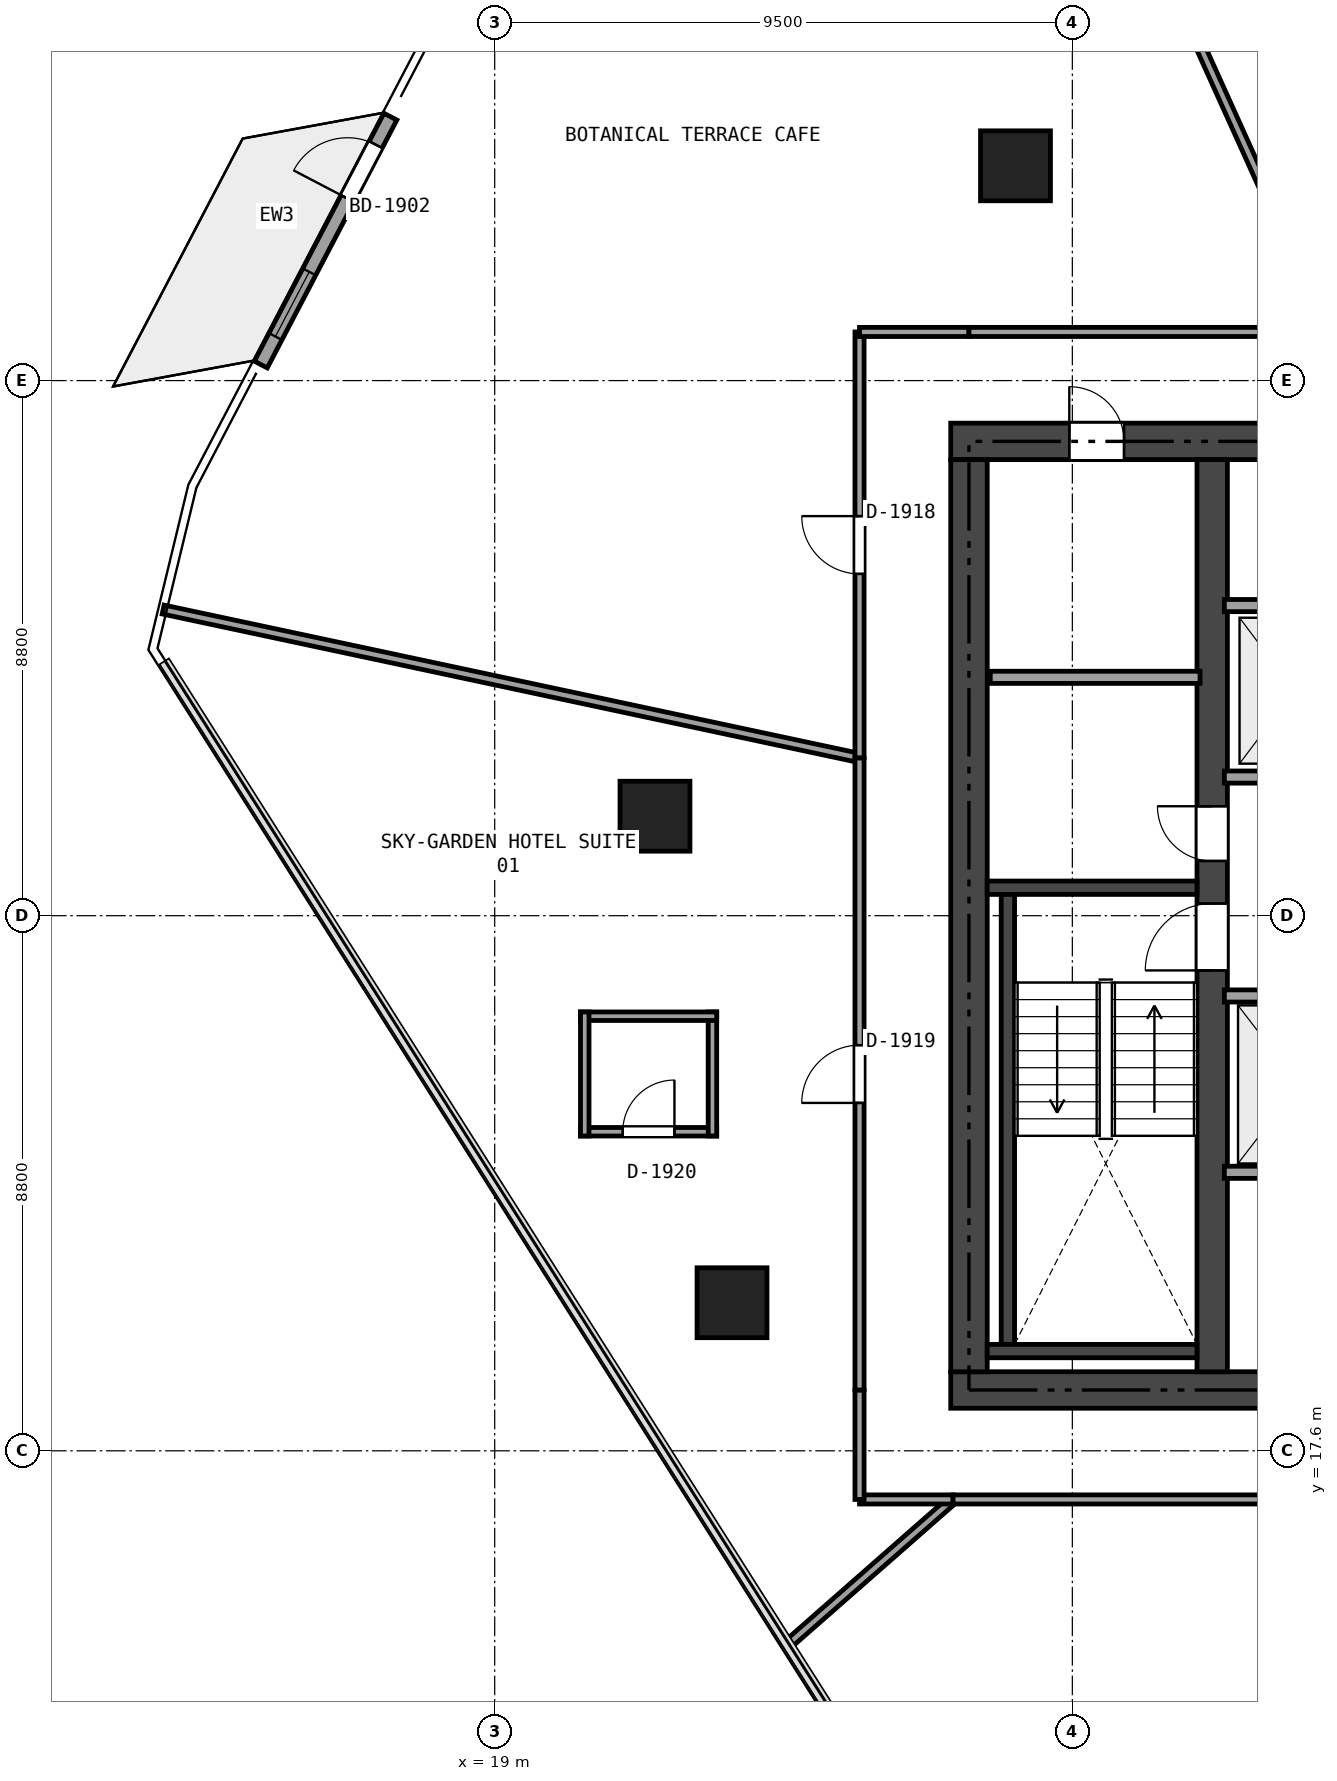
"""IFC4 building model, lengths in metres.
Left out: names, types, materials, properties, quantities, classifications, styles, units other than length and angle.
Written with IfcOpenShell. Run it as: python <this file> out.ifc"""

import sys

from ifc_helpers import new_model, si_unit, direction, frame, frame_2d, origin, origin_2d, place, context, subcontext, project, spatial, rectangle, extrude, element, fill, save


model = new_model("IFC4")
c1 = context("Model", 3, precision=1e-05, world=origin(), true_north=direction((0.0, 1.0)))
c2 = subcontext(c1, "Body", "Model", "MODEL_VIEW")
j1 = project(units=[si_unit("LENGTHUNIT", "METRE"), si_unit("PLANEANGLEUNIT", "RADIAN")], contexts=[c1])
p1 = place(None, origin())
s1 = spatial("IfcSite", under=j1, at=p1, CompositionType="ELEMENT")
p2 = place(p1, origin())
s2 = spatial("IfcBuilding", under=s1, at=p2, CompositionType="ELEMENT")
p3 = place(p2, frame((0.0, 0.0, 76.35)))
s3 = spatial("IfcBuildingStorey", under=s2, at=p3, CompositionType="ELEMENT", Elevation=76.35)
p4 = place(p3, frame((26.5, 18.6, 0.0), z_axis=(0.0, 0.0, 1.0), x_axis=(1.0, 0.0, 0.0)))
e1 = element("IfcWall", 1, at=p4, inside=s3, PredefinedType="SHEAR", context=c2, shape_type="SweptSolid", body=[
    extrude(rectangle(XDim=21.4, YDim=0.6, at=frame_2d((10.7, 0.0))), origin(), (0.0, 0.0, 1.0), 3.17),
])
p5 = place(p4, frame((12.425, 0.0, 0.0)))
e2 = element("IfcOpeningElement", 2, at=p5, cuts=e1, PredefinedType="OPENING", context=c2, shape_type="SweptSolid", body=[
    extrude(rectangle(XDim=1.15, YDim=2.15, at=frame_2d((0.575, 1.075))), frame((0.0, 0.31, 0.0), z_axis=(0.0, -1.0, 0.0), x_axis=(1.0, 0.0, 0.0)), (0.0, 0.0, 1.0), 0.62),
])
p6 = place(p4, frame((5.25, 0.0, 0.0)))
e3 = element("IfcOpeningElement", 3, at=p6, cuts=e1, PredefinedType="OPENING", context=c2, shape_type="SweptSolid", body=[
    extrude(rectangle(XDim=0.9, YDim=2.1, at=frame_2d((0.45, 1.05))), frame((0.0, 0.31, 0.0), z_axis=(0.0, -1.0, 0.0), x_axis=(1.0, 0.0, 0.0)), (0.0, 0.0, 1.0), 0.62),
])
p7 = place(p3, frame((26.5, 34.2, 0.0), z_axis=(0.0, 0.0, 1.0), x_axis=(1.0, 0.0, 0.0)))
e4 = element("IfcWall", 4, at=p7, inside=s3, PredefinedType="SHEAR", context=c2, shape_type="SweptSolid", body=[
    extrude(rectangle(XDim=21.4, YDim=0.6, at=frame_2d((10.7, 0.0))), origin(), (0.0, 0.0, 1.0), 3.17),
])
p8 = place(p7, frame((9.7, 0.0, 0.0)))
e5 = element("IfcOpeningElement", 5, at=p8, cuts=e4, PredefinedType="OPENING", context=c2, shape_type="SweptSolid", body=[
    extrude(rectangle(XDim=1.1, YDim=2.15, at=frame_2d((0.55, 1.075))), frame((0.0, 0.31, 0.0), z_axis=(0.0, -1.0, 0.0), x_axis=(1.0, 0.0, 0.0)), (0.0, 0.0, 1.0), 0.62),
])
p9 = place(p7, frame((1.95, 0.0, 0.0)))
e6 = element("IfcOpeningElement", 6, at=p9, cuts=e4, PredefinedType="OPENING", context=c2, shape_type="SweptSolid", body=[
    extrude(rectangle(XDim=0.9, YDim=2.1, at=frame_2d((0.45, 1.05))), frame((0.0, 0.31, 0.0), z_axis=(0.0, -1.0, 0.0), x_axis=(1.0, 0.0, 0.0)), (0.0, 0.0, 1.0), 0.62),
])
p10 = place(p7, frame((6.25, 0.0, 0.0)))
e7 = element("IfcOpeningElement", 7, at=p10, cuts=e4, PredefinedType="OPENING", context=c2, shape_type="SweptSolid", body=[
    extrude(rectangle(XDim=0.9, YDim=2.1, at=frame_2d((0.45, 1.05))), frame((0.0, 0.31, 0.0), z_axis=(0.0, -1.0, 0.0), x_axis=(1.0, 0.0, 0.0)), (0.0, 0.0, 1.0), 0.62),
])
p11 = place(p3, frame((26.8, 18.9, 0.0), z_axis=(0.0, 0.0, 1.0), x_axis=(0.0, 1.0, 0.0)))
e8 = element("IfcWall", 8, at=p11, inside=s3, PredefinedType="SHEAR", context=c2, shape_type="SweptSolid", body=[
    extrude(rectangle(XDim=15.0, YDim=0.6, at=frame_2d((7.5, 0.0))), origin(), (0.0, 0.0, 1.0), 3.17),
])
p12 = place(p3, frame((30.8, 18.9, 0.0), z_axis=(0.0, 0.0, 1.0), x_axis=(0.0, 1.0, 0.0)))
e9 = element("IfcWall", 9, at=p12, inside=s3, PredefinedType="SHEAR", context=c2, shape_type="SweptSolid", body=[
    extrude(rectangle(XDim=15.0, YDim=0.5, at=frame_2d((7.5, 0.0))), origin(), (0.0, 0.0, 1.0), 3.17),
])
p13 = place(p12, frame((6.6, 0.0, 0.0)))
e10 = element("IfcOpeningElement", 10, at=p13, cuts=e9, PredefinedType="OPENING", context=c2, shape_type="SweptSolid", body=[
    extrude(rectangle(XDim=1.1, YDim=2.15, at=frame_2d((0.55, 1.075))), frame((0.0, 0.26, 0.0), z_axis=(0.0, -1.0, 0.0), x_axis=(1.0, 0.0, 0.0)), (0.0, 0.0, 1.0), 0.52),
])
p14 = place(p12, frame((8.4, 0.0, 0.0)))
e11 = element("IfcOpeningElement", 11, at=p14, cuts=e9, PredefinedType="OPENING", context=c2, shape_type="SweptSolid", body=[
    extrude(rectangle(XDim=0.9, YDim=2.1, at=frame_2d((0.45, 1.05))), frame((0.0, 0.26, 0.0), z_axis=(0.0, -1.0, 0.0), x_axis=(1.0, 0.0, 0.0)), (0.0, 0.0, 1.0), 0.52),
])
p15 = place(p3, frame((27.1, 26.86, 0.0), z_axis=(0.0, 0.0, 1.0), x_axis=(1.0, 0.0, 0.0)))
e12 = element("IfcWall", 12, at=p15, inside=s3, PredefinedType="SHEAR", context=c2, shape_type="SweptSolid", body=[
    extrude(rectangle(XDim=3.45, YDim=0.22, at=frame_2d((1.725, 0.0))), origin(), (0.0, 0.0, 1.0), 3.17),
])
p16 = place(p3, frame((27.44, 19.35, 0.0), z_axis=(0.0, 0.0, 1.0), x_axis=(0.0, 1.0, 0.0)))
e13 = element("IfcWall", 13, at=p16, inside=s3, PredefinedType="SHEAR", context=c2, shape_type="SweptSolid", body=[
    extrude(rectangle(XDim=7.4, YDim=0.22, at=frame_2d((3.7, 0.0))), origin(), (0.0, 0.0, 1.0), 3.17),
])
p17 = place(p3, frame((27.1, 19.24, 0.0), z_axis=(0.0, 0.0, 1.0), x_axis=(1.0, 0.0, 0.0)))
e14 = element("IfcWall", 14, at=p17, inside=s3, PredefinedType="SHEAR", context=c2, shape_type="SweptSolid", body=[
    extrude(rectangle(XDim=3.45, YDim=0.22, at=frame_2d((1.725, 0.0))), origin(), (0.0, 0.0, 1.0), 3.17),
])
for number, where, z_axis, x_axis in (
    (15, (27.565, 38.732, -0.405), (0.0, 0.0, 1.0), (1.0, 0.0, 0.0)),
    (16, (21.636, 28.036, -0.405), (0.0, 0.0, 1.0), (1.0, 0.0, 0.0)),
    (17, (22.903, 20.035, -0.405), (0.0, 0.0, 1.0), (1.0, 0.0, 0.0)),
):
    element("IfcColumn", number, at=place(p3, frame(where, z_axis=z_axis, x_axis=x_axis)), inside=s3, PredefinedType="COLUMN", context=c2, shape_type="SweptSolid", body=[
        extrude(rectangle(XDim=1.15, YDim=1.15, at=origin_2d()), origin(), (0.0, 0.0, 1.0), 3.575),
    ])
p18 = place(p3, frame((15.153, 35.464, 0.0), z_axis=(0.0, 0.0, 1.0), x_axis=(0.463211579043, 0.886247726677, 0.0)))
e18 = element("IfcWall", 18, at=p18, inside=s3, PredefinedType="SOLIDWALL", context=c2, shape_type="SweptSolid", body=[
    extrude(rectangle(XDim=4.6, YDim=0.24, at=frame_2d((2.3, 0.0))), origin(), (0.0, 0.0, 1.0), 3.17),
])
p19 = place(p18, frame((3.08, 0.0, 0.0)))
e19 = element("IfcOpeningElement", 19, at=p19, cuts=e18, PredefinedType="OPENING", context=c2, shape_type="SweptSolid", body=[
    extrude(rectangle(XDim=1.0, YDim=2.15, at=frame_2d((0.5, 1.075))), frame((0.0, 0.13, 0.0), z_axis=(0.0, -1.0, 0.0), x_axis=(1.0, 0.0, 0.0)), (0.0, 0.0, 1.0), 0.26),
])
p20 = place(p18, frame((0.52, 0.0, 0.2)))
e20 = element("IfcOpeningElement", 20, at=p20, cuts=e18, PredefinedType="OPENING", context=c2, shape_type="SweptSolid", body=[
    extrude(rectangle(XDim=1.2, YDim=1.8, at=frame_2d((0.6, 0.9))), frame((0.0, 0.13, 0.0), z_axis=(0.0, -1.0, 0.0), x_axis=(1.0, 0.0, 0.0)), (0.0, 0.0, 1.0), 0.26),
])
p21 = place(p3, frame((27.15, 30.32, 0.0), z_axis=(0.0, 0.0, 1.0), x_axis=(1.0, 0.0, 0.0)))
e21 = element("IfcWall", 21, at=p21, inside=s3, PredefinedType="SOLIDWALL", context=c2, shape_type="SweptSolid", body=[
    extrude(rectangle(XDim=3.45, YDim=0.2, at=frame_2d((1.725, 0.0))), origin(), (0.0, 0.0, 1.0), 3.17),
])
p22 = place(p3, frame((31.0, 28.68, 0.0), z_axis=(0.0, 0.0, 1.0), x_axis=(1.0, 0.0, 0.0)))
e22 = element("IfcWall", 22, at=p22, inside=s3, PredefinedType="SOLIDWALL", context=c2, shape_type="SweptSolid", body=[
    extrude(rectangle(XDim=4.42, YDim=0.2, at=frame_2d((2.21, 0.0))), origin(), (0.0, 0.0, 1.0), 3.17),
])
p23 = place(p22, frame((0.6, 0.0, 0.0)))
e23 = element("IfcOpeningElement", 23, at=p23, cuts=e22, PredefinedType="OPENING", context=c2, shape_type="SweptSolid", body=[
    extrude(rectangle(XDim=1.1, YDim=2.15, at=frame_2d((0.55, 1.075))), frame((0.0, 0.11, 0.0), z_axis=(0.0, -1.0, 0.0), x_axis=(1.0, 0.0, 0.0)), (0.0, 0.0, 1.0), 0.22),
])
p24 = place(p22, frame((2.85, 0.0, 0.0)))
e24 = element("IfcOpeningElement", 24, at=p24, cuts=e22, PredefinedType="OPENING", context=c2, shape_type="SweptSolid", body=[
    extrude(rectangle(XDim=1.1, YDim=2.15, at=frame_2d((0.55, 1.075))), frame((0.0, 0.11, 0.0), z_axis=(0.0, -1.0, 0.0), x_axis=(1.0, 0.0, 0.0)), (0.0, 0.0, 1.0), 0.22),
])
p25 = place(p3, frame((31.0, 31.5, 0.0), z_axis=(0.0, 0.0, 1.0), x_axis=(1.0, 0.0, 0.0)))
e25 = element("IfcWall", 25, at=p25, inside=s3, PredefinedType="SOLIDWALL", context=c2, shape_type="SweptSolid", body=[
    extrude(rectangle(XDim=4.42, YDim=0.2, at=frame_2d((2.21, 0.0))), origin(), (0.0, 0.0, 1.0), 3.17),
])
p26 = place(p3, frame((31.0, 25.08, 0.0), z_axis=(0.0, 0.0, 1.0), x_axis=(1.0, 0.0, 0.0)))
e26 = element("IfcWall", 26, at=p26, inside=s3, PredefinedType="SOLIDWALL", context=c2, shape_type="SweptSolid", body=[
    extrude(rectangle(XDim=4.42, YDim=0.2, at=frame_2d((2.21, 0.0))), origin(), (0.0, 0.0, 1.0), 3.17),
])
p27 = place(p26, frame((3.0, 0.0, 0.0)))
e27 = element("IfcOpeningElement", 27, at=p27, cuts=e26, PredefinedType="OPENING", context=c2, shape_type="SweptSolid", body=[
    extrude(rectangle(XDim=0.9, YDim=2.1, at=frame_2d((0.45, 1.05))), frame((0.0, 0.11, 0.0), z_axis=(0.0, -1.0, 0.0), x_axis=(1.0, 0.0, 0.0)), (0.0, 0.0, 1.0), 0.22),
])
p28 = place(p26, frame((0.62, 0.0, 0.0)))
e28 = element("IfcOpeningElement", 28, at=p28, cuts=e26, PredefinedType="OPENING", context=c2, shape_type="SweptSolid", body=[
    extrude(rectangle(XDim=1.2, YDim=2.15, at=frame_2d((0.6, 1.075))), frame((0.0, 0.11, 0.0), z_axis=(0.0, -1.0, 0.0), x_axis=(1.0, 0.0, 0.0)), (0.0, 0.0, 1.0), 0.22),
])
p29 = place(p3, frame((31.0, 22.18, 0.0), z_axis=(0.0, 0.0, 1.0), x_axis=(1.0, 0.0, 0.0)))
e29 = element("IfcWall", 29, at=p29, inside=s3, PredefinedType="SOLIDWALL", context=c2, shape_type="SweptSolid", body=[
    extrude(rectangle(XDim=2.42, YDim=0.2, at=frame_2d((1.21, 0.0))), origin(), (0.0, 0.0, 1.0), 3.17),
])
p30 = place(p3, frame((20.411, 22.847, 0.0), z_axis=(0.0, 0.0, 1.0), x_axis=(1.0, 0.0, 0.0)))
e30 = element("IfcWall", 30, at=p30, inside=s3, PredefinedType="PARTITIONING", context=c2, shape_type="SweptSolid", body=[
    extrude(rectangle(XDim=2.24, YDim=0.14, at=frame_2d((1.12, 0.0))), origin(), (0.0, 0.0, 1.0), 2.455),
])
p31 = place(p30, frame((0.695, 0.0, 0.0)))
e31 = element("IfcOpeningElement", 31, at=p31, cuts=e30, PredefinedType="OPENING", context=c2, shape_type="SweptSolid", body=[
    extrude(rectangle(XDim=0.85, YDim=2.1, at=frame_2d((0.425, 1.05))), frame((0.0, 0.08, 0.0), z_axis=(0.0, -1.0, 0.0), x_axis=(1.0, 0.0, 0.0)), (0.0, 0.0, 1.0), 0.16),
])
p32 = place(p3, frame((22.581, 22.777, 0.0), z_axis=(0.0, 0.0, 1.0), x_axis=(0.0, 1.0, 0.0)))
e32 = element("IfcWall", 32, at=p32, inside=s3, PredefinedType="PARTITIONING", context=c2, shape_type="SweptSolid", body=[
    extrude(rectangle(XDim=2.04, YDim=0.14, at=frame_2d((1.02, 0.0))), origin(), (0.0, 0.0, 1.0), 2.455),
])
p33 = place(p3, frame((22.651, 24.747, 0.0), z_axis=(0.0, 0.0, 1.0), x_axis=(-1.0, 0.0, 0.0)))
e33 = element("IfcWall", 33, at=p33, inside=s3, PredefinedType="PARTITIONING", context=c2, shape_type="SweptSolid", body=[
    extrude(rectangle(XDim=2.24, YDim=0.14, at=frame_2d((1.12, 0.0))), origin(), (0.0, 0.0, 1.0), 2.455),
])
p34 = place(p3, frame((20.481, 24.817, 0.0), z_axis=(0.0, 0.0, 1.0), x_axis=(0.0, -1.0, 0.0)))
e34 = element("IfcWall", 34, at=p34, inside=s3, PredefinedType="PARTITIONING", context=c2, shape_type="SweptSolid", body=[
    extrude(rectangle(XDim=2.04, YDim=0.14, at=frame_2d((1.02, 0.0))), origin(), (0.0, 0.0, 1.0), 3.17),
])
p35 = place(p3, frame((29.093, 44.04, 0.0), z_axis=(0.0, 0.0, 1.0), x_axis=(0.41148290583, -0.911417477455, 0.0)))
e35 = element("IfcWall", 35, at=p35, inside=s3, PredefinedType="PARTITIONING", context=c2, shape_type="SweptSolid", body=[
    extrude(rectangle(XDim=8.822, YDim=0.15, at=frame_2d((4.411, 0.0))), origin(), (0.0, 0.0, 1.0), 2.455),
])
p36 = place(p3, frame((13.547, 31.435, 0.0), z_axis=(0.0, 0.0, 1.0), x_axis=(0.978012740802, -0.208545148179, 0.0)))
e36 = element("IfcWall", 36, at=p36, inside=s3, PredefinedType="PARTITIONING", context=c2, shape_type="SweptSolid", body=[
    extrude(rectangle(XDim=11.71, YDim=0.15, at=frame_2d((5.855, 0.0))), origin(), (0.0, 0.0, 1.0), 2.455),
])
p37 = place(p3, frame((25.0, 28.993, 0.0), z_axis=(0.0, 0.0, 1.0), x_axis=(0.0, 1.0, 0.0)))
e37 = element("IfcWall", 37, at=p37, inside=s3, PredefinedType="PARTITIONING", context=c2, shape_type="SweptSolid", body=[
    extrude(rectangle(XDim=7.007, YDim=0.15, at=frame_2d((3.503, 0.0))), origin(), (0.0, 0.0, 1.0), 2.455),
])
p38 = place(p37, frame((3.028, 0.0, 0.0)))
e38 = element("IfcOpeningElement", 38, at=p38, cuts=e37, PredefinedType="OPENING", context=c2, shape_type="SweptSolid", body=[
    extrude(rectangle(XDim=0.95, YDim=2.15, at=frame_2d((0.475, 1.075))), frame((0.0, 0.085, 0.0), z_axis=(0.0, -1.0, 0.0), x_axis=(1.0, 0.0, 0.0)), (0.0, 0.0, 1.0), 0.17),
])
p39 = place(p3, frame((25.0, 36.0, 0.0), z_axis=(0.0, 0.0, 1.0), x_axis=(1.0, 0.0, 0.0)))
e39 = element("IfcWall", 39, at=p39, inside=s3, PredefinedType="PARTITIONING", context=c2, shape_type="SweptSolid", body=[
    extrude(rectangle(XDim=1.8, YDim=0.15, at=frame_2d((0.9, 0.0))), origin(), (0.0, 0.0, 1.0), 2.455),
])
p40 = place(p3, frame((26.8, 36.0, 0.0), z_axis=(0.0, 0.0, 1.0), x_axis=(1.0, 0.0, 0.0)))
e40 = element("IfcWall", 40, at=p40, inside=s3, PredefinedType="PARTITIONING", context=c2, shape_type="SweptSolid", body=[
    extrude(rectangle(XDim=5.923, YDim=0.15, at=frame_2d((2.961, 0.0))), origin(), (0.0, 0.0, 1.0), 2.467),
])
p41 = place(p3, frame((23.793, 14.391, 0.0), z_axis=(0.0, 0.0, 1.0), x_axis=(0.751631776081, 0.659582953983, 0.0)))
e41 = element("IfcWall", 41, at=p41, inside=s3, PredefinedType="PARTITIONING", context=c2, shape_type="SweptSolid", body=[
    extrude(rectangle(XDim=3.652, YDim=0.15, at=frame_2d((1.826, 0.0))), origin(), (0.0, 0.0, 1.0), 2.455),
])
p42 = place(p3, frame((26.538, 16.8, 0.0), z_axis=(0.0, 0.0, 1.0), x_axis=(-1.0, 0.0, 0.0)))
e42 = element("IfcWall", 42, at=p42, inside=s3, PredefinedType="PARTITIONING", context=c2, shape_type="SweptSolid", body=[
    extrude(rectangle(XDim=1.538, YDim=0.15, at=frame_2d((0.769, 0.0))), origin(), (0.0, 0.0, 1.0), 2.455),
])
p43 = place(p3, frame((25.0, 16.8, 0.0), z_axis=(0.0, 0.0, 1.0), x_axis=(0.0, 1.0, 0.0)))
e43 = element("IfcWall", 43, at=p43, inside=s3, PredefinedType="PARTITIONING", context=c2, shape_type="SweptSolid", body=[
    extrude(rectangle(XDim=1.8, YDim=0.15, at=frame_2d((0.9, 0.0))), origin(), (0.0, 0.0, 1.0), 2.455),
])
p44 = place(p3, frame((25.0, 18.6, 0.0), z_axis=(0.0, 0.0, 1.0), x_axis=(0.0, 1.0, 0.0)))
e44 = element("IfcWall", 44, at=p44, inside=s3, PredefinedType="PARTITIONING", context=c2, shape_type="SweptSolid", body=[
    extrude(rectangle(XDim=10.393, YDim=0.15, at=frame_2d((5.196, 0.0))), origin(), (0.0, 0.0, 1.0), 2.467),
])
p45 = place(p44, frame((4.721, 0.0, 0.0)))
e45 = element("IfcOpeningElement", 45, at=p45, cuts=e44, PredefinedType="OPENING", context=c2, shape_type="SweptSolid", body=[
    extrude(rectangle(XDim=0.95, YDim=2.15, at=frame_2d((0.475, 1.075))), frame((0.0, 0.085, 0.0), z_axis=(0.0, -1.0, 0.0), x_axis=(1.0, 0.0, 0.0)), (0.0, 0.0, 1.0), 0.17),
])
p46 = place(p3, frame((38.209, 16.8, 0.0), z_axis=(0.0, 0.0, 1.0), x_axis=(-1.0, 0.0, 0.0)))
e46 = element("IfcWall", 46, at=p46, inside=s3, PredefinedType="PARTITIONING", context=c2, shape_type="SweptSolid", body=[
    extrude(rectangle(XDim=11.671, YDim=0.15, at=frame_2d((5.835, 0.0))), origin(), (0.0, 0.0, 1.0), 2.455),
])
p47 = place(p46, frame((5.361, 0.0, 0.0)))
e47 = element("IfcOpeningElement", 47, at=p47, cuts=e46, PredefinedType="OPENING", context=c2, shape_type="SweptSolid", body=[
    extrude(rectangle(XDim=0.95, YDim=2.15, at=frame_2d((0.475, 1.075))), frame((0.0, 0.085, 0.0), z_axis=(0.0, -1.0, 0.0), x_axis=(1.0, 0.0, 0.0)), (0.0, 0.0, 1.0), 0.17),
])
p48 = place(p19, origin())
e48 = element("IfcDoor", 48, at=p48, inside=s3, OperationType="SINGLE_SWING_LEFT", PredefinedType="DOOR", context=c2, shape_type="SweptSolid", body=[
    extrude(rectangle(XDim=1.0, YDim=2.15, at=frame_2d((0.5, 1.075))), frame((0.0, 0.025, 0.0), z_axis=(0.0, -1.0, 0.0), x_axis=(1.0, 0.0, 0.0)), (0.0, 0.0, 1.0), 0.05),
])
fill(e19, e48)
p49 = place(p20, origin())
e49 = element("IfcWindow", 49, at=p49, inside=s3, PartitioningType="SINGLE_PANEL", PredefinedType="WINDOW", context=c2, shape_type="SweptSolid", body=[
    extrude(rectangle(XDim=1.2, YDim=1.8, at=frame_2d((0.6, 0.9))), frame((0.0, 0.03, 0.0), z_axis=(0.0, -1.0, 0.0), x_axis=(1.0, 0.0, 0.0)), (0.0, 0.0, 1.0), 0.06),
])
fill(e20, e49)
p50 = place(p13, origin())
e50 = element("IfcDoor", 50, at=p50, inside=s3, OperationType="SINGLE_SWING_LEFT", PredefinedType="DOOR", context=c2, shape_type="SweptSolid", body=[
    extrude(rectangle(XDim=1.1, YDim=2.15, at=frame_2d((0.55, 1.075))), frame((0.0, 0.025, 0.0), z_axis=(0.0, -1.0, 0.0), x_axis=(1.0, 0.0, 0.0)), (0.0, 0.0, 1.0), 0.05),
])
fill(e10, e50)
p51 = place(p14, origin())
e51 = element("IfcDoor", 51, at=p51, inside=s3, OperationType="SINGLE_SWING_RIGHT", PredefinedType="DOOR", context=c2, shape_type="SweptSolid", body=[
    extrude(rectangle(XDim=0.9, YDim=2.1, at=frame_2d((0.45, 1.05))), frame((0.0, 0.025, 0.0), z_axis=(0.0, -1.0, 0.0), x_axis=(1.0, 0.0, 0.0)), (0.0, 0.0, 1.0), 0.05),
])
fill(e11, e51)
p52 = place(p9, origin())
e52 = element("IfcDoor", 52, at=p52, inside=s3, OperationType="SINGLE_SWING_LEFT", PredefinedType="DOOR", context=c2, shape_type="SweptSolid", body=[
    extrude(rectangle(XDim=0.9, YDim=2.1, at=frame_2d((0.45, 1.05))), frame((0.0, 0.025, 0.0), z_axis=(0.0, -1.0, 0.0), x_axis=(1.0, 0.0, 0.0)), (0.0, 0.0, 1.0), 0.05),
])
fill(e6, e52)
p53 = place(p38, origin())
e53 = element("IfcDoor", 53, at=p53, inside=s3, OperationType="SINGLE_SWING_RIGHT", PredefinedType="DOOR", context=c2, shape_type="SweptSolid", body=[
    extrude(rectangle(XDim=0.95, YDim=2.15, at=frame_2d((0.475, 1.075))), frame((0.0, 0.025, 0.0), z_axis=(0.0, -1.0, 0.0), x_axis=(1.0, 0.0, 0.0)), (0.0, 0.0, 1.0), 0.05),
])
fill(e38, e53)
p54 = place(p45, origin())
e54 = element("IfcDoor", 54, at=p54, inside=s3, OperationType="SINGLE_SWING_LEFT", PredefinedType="DOOR", context=c2, shape_type="SweptSolid", body=[
    extrude(rectangle(XDim=0.95, YDim=2.15, at=frame_2d((0.475, 1.075))), frame((0.0, 0.025, 0.0), z_axis=(0.0, -1.0, 0.0), x_axis=(1.0, 0.0, 0.0)), (0.0, 0.0, 1.0), 0.05),
])
fill(e45, e54)
p55 = place(p31, origin())
e55 = element("IfcDoor", 55, at=p55, inside=s3, OperationType="SINGLE_SWING_RIGHT", PredefinedType="DOOR", context=c2, shape_type="SweptSolid", body=[
    extrude(rectangle(XDim=0.85, YDim=2.1, at=frame_2d((0.425, 1.05))), frame((0.0, 0.025, 0.0), z_axis=(0.0, -1.0, 0.0), x_axis=(1.0, 0.0, 0.0)), (0.0, 0.0, 1.0), 0.05),
])
fill(e31, e55)
save(model, sys.argv[1])
